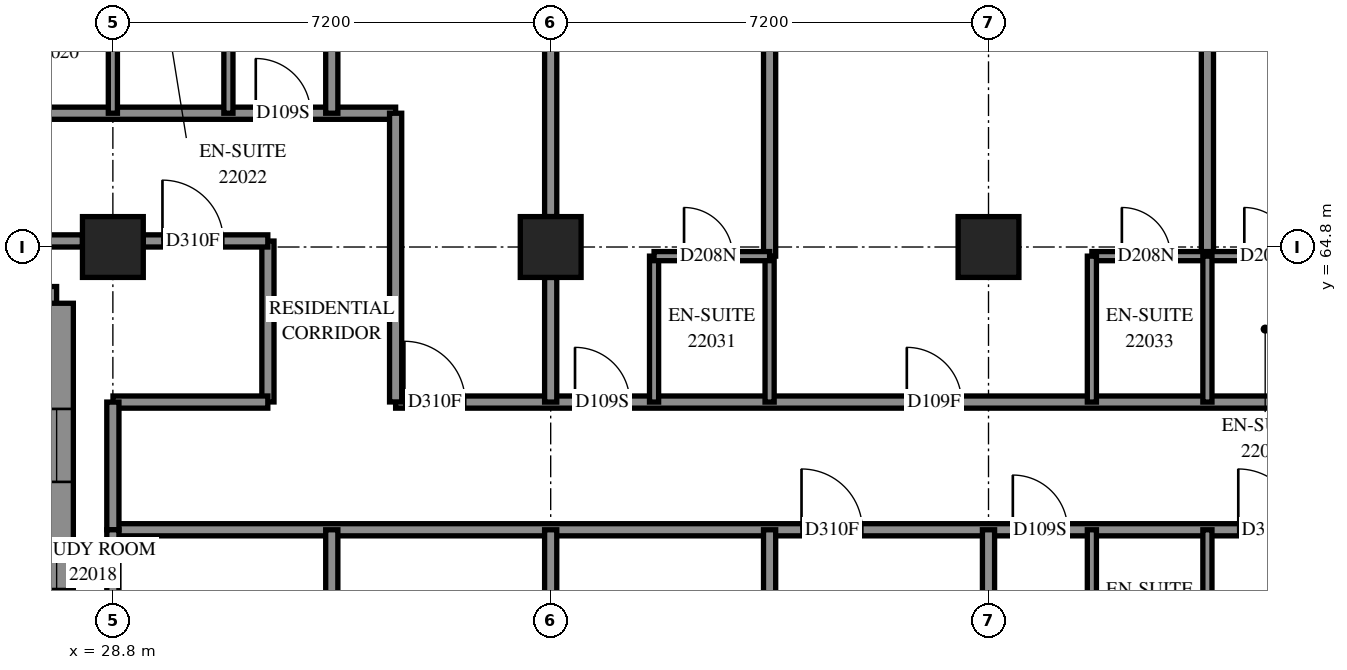
"""IFC4 building model, lengths in metres.
Left out: names, types, materials, properties, quantities, classifications, styles, units other than length and angle.
Written with IfcOpenShell. Run it as: python <this file> out.ifc"""

import sys

from ifc_helpers import new_model, si_unit, direction, frame, frame_2d, origin, origin_2d, place, context, subcontext, project, spatial, polyline, rectangle, outline, extrude, element, fill, save


model = new_model("IFC4")
c1 = context("Model", 3, precision=1e-05, world=origin(), true_north=direction((0.0, 1.0)))
c2 = subcontext(c1, "Body", "Model", "MODEL_VIEW")
j1 = project(units=[si_unit("LENGTHUNIT", "METRE"), si_unit("PLANEANGLEUNIT", "RADIAN")], contexts=[c1])
p1 = place(None, origin())
s1 = spatial("IfcSite", under=j1, at=p1, CompositionType="ELEMENT")
p2 = place(p1, origin())
s2 = spatial("IfcBuilding", under=s1, at=p2, CompositionType="ELEMENT")
p3 = place(p2, frame((0.0, 0.0, 84.6)))
s3 = spatial("IfcBuildingStorey", under=s2, at=p3, CompositionType="ELEMENT", Elevation=84.6)
for number, where, z_axis, x_axis in (
    (1, (28.8, 64.8, 0.0), (0.0, 0.0, 1.0), (1.0, 0.0, 0.0)),
    (2, (36.0, 64.8, 0.0), (0.0, 0.0, 1.0), (1.0, 0.0, 0.0)),
    (3, (43.2, 64.8, 0.0), (0.0, 0.0, 1.0), (1.0, 0.0, 0.0)),
):
    element("IfcColumn", number, at=place(p3, frame(where, z_axis=z_axis, x_axis=x_axis)), inside=s3, PredefinedType="COLUMN", context=c2, shape_type="SweptSolid", body=[
        extrude(rectangle(XDim=1.0, YDim=1.0, at=origin_2d()), origin(), (0.0, 0.0, 1.0), 3.1),
    ])
p4 = place(p3, frame((19.745, 63.875, 0.0), z_axis=(0.0, 0.0, 1.0), x_axis=(1.0, 0.0, 0.0)))
e4 = element("IfcWall", 4, at=p4, inside=s3, PredefinedType="SOLIDWALL", context=c2, shape_type="SweptSolid", body=[
    extrude(outline(polyline([(-0.275, -0.275), (7.855, -0.275), (8.405, 0.275), (0.275, 0.275), (-0.275, -0.275)])), origin(), (0.0, 0.0, 1.0), 3.1),
])
p5 = place(p4, frame((2.005, 0.0, 0.5)))
e5 = element("IfcOpeningElement", 5, at=p5, cuts=e4, PredefinedType="OPENING", context=c2, shape_type="SweptSolid", body=[
    extrude(rectangle(XDim=1.3, YDim=2.45, at=frame_2d((0.65, 1.225))), frame((0.0, 0.285, 0.0), z_axis=(0.0, -1.0, 0.0), x_axis=(1.0, 0.0, 0.0)), (0.0, 0.0, 1.0), 0.57),
])
p6 = place(p4, frame((3.505, 0.0, 0.5)))
e6 = element("IfcOpeningElement", 6, at=p6, cuts=e4, PredefinedType="OPENING", context=c2, shape_type="SweptSolid", body=[
    extrude(rectangle(XDim=1.3, YDim=2.45, at=frame_2d((0.65, 1.225))), frame((0.0, 0.285, 0.0), z_axis=(0.0, -1.0, 0.0), x_axis=(1.0, 0.0, 0.0)), (0.0, 0.0, 1.0), 0.57),
])
p7 = place(p4, frame((6.093, 0.0, 0.5)))
e7 = element("IfcOpeningElement", 7, at=p7, cuts=e4, PredefinedType="OPENING", context=c2, shape_type="SweptSolid", body=[
    extrude(rectangle(XDim=1.2, YDim=2.45, at=frame_2d((0.6, 1.225))), frame((0.0, 0.285, 0.0), z_axis=(0.0, -1.0, 0.0), x_axis=(1.0, 0.0, 0.0)), (0.0, 0.0, 1.0), 0.57),
])
p8 = place(p3, frame((27.875, 63.875, 0.0), z_axis=(0.0, 0.0, 1.0), x_axis=(0.0, -1.0, 0.0)))
e8 = element("IfcWall", 8, at=p8, inside=s3, PredefinedType="SOLIDWALL", context=c2, shape_type="SweptSolid", body=[
    extrude(outline(polyline([(0.275, -0.275), (8.405, -0.275), (7.855, 0.275), (-0.275, 0.275), (0.275, -0.275)])), origin(), (0.0, 0.0, 1.0), 3.1),
])
p9 = place(p8, frame((4.825, 0.0, 0.5)))
e9 = element("IfcOpeningElement", 9, at=p9, cuts=e8, PredefinedType="OPENING", context=c2, shape_type="SweptSolid", body=[
    extrude(rectangle(XDim=1.3, YDim=2.45, at=frame_2d((0.65, 1.225))), frame((0.0, 0.285, 0.0), z_axis=(0.0, -1.0, 0.0), x_axis=(1.0, 0.0, 0.0)), (0.0, 0.0, 1.0), 0.57),
])
p10 = place(p8, frame((1.738, 0.0, 0.5)))
e10 = element("IfcOpeningElement", 10, at=p10, cuts=e8, PredefinedType="OPENING", context=c2, shape_type="SweptSolid", body=[
    extrude(rectangle(XDim=1.2, YDim=2.45, at=frame_2d((0.6, 1.225))), frame((0.0, 0.285, 0.0), z_axis=(0.0, -1.0, 0.0), x_axis=(1.0, 0.0, 0.0)), (0.0, 0.0, 1.0), 0.57),
])
p11 = place(p8, frame((3.9, 0.0, 0.45)))
e11 = element("IfcOpeningElement", 11, at=p11, cuts=e8, PredefinedType="OPENING", context=c2, shape_type="SweptSolid", body=[
    extrude(rectangle(XDim=0.8, YDim=2.5, at=frame_2d((0.4, 1.25))), frame((0.0, 0.285, 0.0), z_axis=(0.0, -1.0, 0.0), x_axis=(1.0, 0.0, 0.0)), (0.0, 0.0, 1.0), 0.57),
])
p12 = place(p3, frame((28.8, 60.15, 0.0), z_axis=(0.0, 0.0, 1.0), x_axis=(1.0, 0.0, 0.0)))
e12 = element("IfcWall", 12, at=p12, inside=s3, PredefinedType="PARTITIONING", context=c2, shape_type="SweptSolid", body=[
    extrude(rectangle(XDim=24.15, YDim=0.2, at=frame_2d((12.075, 0.0))), origin(), (0.0, 0.0, 1.0), 3.1),
])
p13 = place(p12, frame((11.325, 0.0, 0.0)))
e13 = element("IfcOpeningElement", 13, at=p13, cuts=e12, PredefinedType="OPENING", context=c2, shape_type="SweptSolid", body=[
    extrude(rectangle(XDim=1.0, YDim=2.1, at=frame_2d((0.5, 1.05))), frame((0.0, 0.11, 0.0), z_axis=(0.0, -1.0, 0.0), x_axis=(1.0, 0.0, 0.0)), (0.0, 0.0, 1.0), 0.22),
])
p14 = place(p12, frame((14.8, 0.0, 0.0)))
e14 = element("IfcOpeningElement", 14, at=p14, cuts=e12, PredefinedType="OPENING", context=c2, shape_type="SweptSolid", body=[
    extrude(rectangle(XDim=0.9, YDim=2.1, at=frame_2d((0.45, 1.05))), frame((0.0, 0.11, 0.0), z_axis=(0.0, -1.0, 0.0), x_axis=(1.0, 0.0, 0.0)), (0.0, 0.0, 1.0), 0.22),
])
p15 = place(p12, frame((18.508, 0.0, 0.0)))
e15 = element("IfcOpeningElement", 15, at=p15, cuts=e12, PredefinedType="OPENING", context=c2, shape_type="SweptSolid", body=[
    extrude(rectangle(XDim=1.0, YDim=2.1, at=frame_2d((0.5, 1.05))), frame((0.0, 0.11, 0.0), z_axis=(0.0, -1.0, 0.0), x_axis=(1.0, 0.0, 0.0)), (0.0, 0.0, 1.0), 0.22),
])
p16 = place(p12, frame((22.882, 0.0, 0.0)))
e16 = element("IfcOpeningElement", 16, at=p16, cuts=e12, PredefinedType="OPENING", context=c2, shape_type="SweptSolid", body=[
    extrude(rectangle(XDim=1.0, YDim=2.1, at=frame_2d((0.5, 1.05))), frame((0.0, 0.11, 0.0), z_axis=(0.0, -1.0, 0.0), x_axis=(1.0, 0.0, 0.0)), (0.0, 0.0, 1.0), 0.22),
])
p17 = place(p3, frame((33.45, 62.25, 0.0), z_axis=(0.0, 0.0, 1.0), x_axis=(1.0, 0.0, 0.0)))
e17 = element("IfcWall", 17, at=p17, inside=s3, PredefinedType="PARTITIONING", context=c2, shape_type="SweptSolid", body=[
    extrude(rectangle(XDim=21.85, YDim=0.2, at=frame_2d((10.925, 0.0))), origin(), (0.0, 0.0, 1.0), 3.1),
])
p18 = place(p17, frame((0.144, 0.0, 0.0)))
e18 = element("IfcOpeningElement", 18, at=p18, cuts=e17, PredefinedType="OPENING", context=c2, shape_type="SweptSolid", body=[
    extrude(rectangle(XDim=1.0, YDim=2.1, at=frame_2d((0.5, 1.05))), frame((0.0, 0.11, 0.0), z_axis=(0.0, -1.0, 0.0), x_axis=(1.0, 0.0, 0.0)), (0.0, 0.0, 1.0), 0.22),
])
p19 = place(p17, frame((2.95, 0.0, 0.0)))
e19 = element("IfcOpeningElement", 19, at=p19, cuts=e17, PredefinedType="OPENING", context=c2, shape_type="SweptSolid", body=[
    extrude(rectangle(XDim=0.9, YDim=2.1, at=frame_2d((0.45, 1.05))), frame((0.0, 0.11, 0.0), z_axis=(0.0, -1.0, 0.0), x_axis=(1.0, 0.0, 0.0)), (0.0, 0.0, 1.0), 0.22),
])
p20 = place(p17, frame((8.407, 0.0, 0.0)))
e20 = element("IfcOpeningElement", 20, at=p20, cuts=e17, PredefinedType="OPENING", context=c2, shape_type="SweptSolid", body=[
    extrude(rectangle(XDim=0.9, YDim=2.1, at=frame_2d((0.45, 1.05))), frame((0.0, 0.11, 0.0), z_axis=(0.0, -1.0, 0.0), x_axis=(1.0, 0.0, 0.0)), (0.0, 0.0, 1.0), 0.22),
])
p21 = place(p17, frame((15.7, 0.0, 0.0)))
e21 = element("IfcOpeningElement", 21, at=p21, cuts=e17, PredefinedType="OPENING", context=c2, shape_type="SweptSolid", body=[
    extrude(rectangle(XDim=0.9, YDim=2.1, at=frame_2d((0.45, 1.05))), frame((0.0, 0.11, 0.0), z_axis=(0.0, -1.0, 0.0), x_axis=(1.0, 0.0, 0.0)), (0.0, 0.0, 1.0), 0.22),
])
p22 = place(p17, frame((17.35, 0.0, 0.0)))
e22 = element("IfcOpeningElement", 22, at=p22, cuts=e17, PredefinedType="OPENING", context=c2, shape_type="SweptSolid", body=[
    extrude(rectangle(XDim=0.9, YDim=2.1, at=frame_2d((0.45, 1.05))), frame((0.0, 0.11, 0.0), z_axis=(0.0, -1.0, 0.0), x_axis=(1.0, 0.0, 0.0)), (0.0, 0.0, 1.0), 0.22),
])
p23 = place(p3, frame((21.602, 67.0, 0.0), z_axis=(0.0, 0.0, 1.0), x_axis=(1.0, 0.0, 0.0)))
e23 = element("IfcWall", 23, at=p23, inside=s3, PredefinedType="PARTITIONING", context=c2, shape_type="SweptSolid", body=[
    extrude(rectangle(XDim=11.848, YDim=0.2, at=frame_2d((5.924, 0.0))), origin(), (0.0, 0.0, 1.0), 3.1),
])
p24 = place(p23, frame((1.791, 0.0, 0.0)))
e24 = element("IfcOpeningElement", 24, at=p24, cuts=e23, PredefinedType="OPENING", context=c2, shape_type="SweptSolid", body=[
    extrude(rectangle(XDim=1.0, YDim=2.1, at=frame_2d((0.5, 1.05))), frame((0.0, 0.11, 0.0), z_axis=(0.0, -1.0, 0.0), x_axis=(1.0, 0.0, 0.0)), (0.0, 0.0, 1.0), 0.22),
])
p25 = place(p23, frame((3.998, 0.0, 0.0)))
e25 = element("IfcOpeningElement", 25, at=p25, cuts=e23, PredefinedType="OPENING", context=c2, shape_type="SweptSolid", body=[
    extrude(rectangle(XDim=0.9, YDim=2.1, at=frame_2d((0.45, 1.05))), frame((0.0, 0.11, 0.0), z_axis=(0.0, -1.0, 0.0), x_axis=(1.0, 0.0, 0.0)), (0.0, 0.0, 1.0), 0.22),
])
p26 = place(p23, frame((9.548, 0.0, 0.0)))
e26 = element("IfcOpeningElement", 26, at=p26, cuts=e23, PredefinedType="OPENING", context=c2, shape_type="SweptSolid", body=[
    extrude(rectangle(XDim=0.9, YDim=2.1, at=frame_2d((0.45, 1.05))), frame((0.0, 0.11, 0.0), z_axis=(0.0, -1.0, 0.0), x_axis=(1.0, 0.0, 0.0)), (0.0, 0.0, 1.0), 0.22),
])
p27 = place(p3, frame((39.6, 64.65, 0.0), z_axis=(0.0, 0.0, 1.0), x_axis=(0.0, 1.0, 0.0)))
e27 = element("IfcWall", 27, at=p27, inside=s3, PredefinedType="PARTITIONING", context=c2, shape_type="SweptSolid", body=[
    extrude(rectangle(XDim=8.101, YDim=0.2, at=frame_2d((4.051, 0.0))), origin(), (0.0, 0.0, 1.0), 3.1),
])
p28 = place(p3, frame((46.8, 64.65, 0.0), z_axis=(0.0, 0.0, 1.0), x_axis=(0.0, 1.0, 0.0)))
e28 = element("IfcWall", 28, at=p28, inside=s3, PredefinedType="PARTITIONING", context=c2, shape_type="SweptSolid", body=[
    extrude(rectangle(XDim=8.069, YDim=0.2, at=frame_2d((4.034, 0.0))), origin(), (0.0, 0.0, 1.0), 3.1),
])
p29 = place(p3, frame((36.0, 65.3, 0.0), z_axis=(0.0, 0.0, 1.0), x_axis=(0.0, 1.0, 0.0)))
e29 = element("IfcWall", 29, at=p29, inside=s3, PredefinedType="PARTITIONING", context=c2, shape_type="SweptSolid", body=[
    extrude(rectangle(XDim=6.2, YDim=0.2, at=frame_2d((3.1, 0.0))), origin(), (0.0, 0.0, 1.0), 3.1),
])
p30 = place(p3, frame((22.1, 64.9, 0.0), z_axis=(0.0, 0.0, 1.0), x_axis=(1.0, 0.0, 0.0)))
e30 = element("IfcWall", 30, at=p30, inside=s3, PredefinedType="PARTITIONING", context=c2, shape_type="SweptSolid", body=[
    extrude(rectangle(XDim=6.2, YDim=0.2, at=frame_2d((3.1, 0.0))), origin(), (0.0, 0.0, 1.0), 2.6),
])
p31 = place(p3, frame((32.4, 67.0, 0.0), z_axis=(0.0, 0.0, 1.0), x_axis=(0.0, 1.0, 0.0)))
e31 = element("IfcWall", 31, at=p31, inside=s3, PredefinedType="PARTITIONING", context=c2, shape_type="SweptSolid", body=[
    extrude(rectangle(XDim=5.784, YDim=0.2, at=frame_2d((2.892, 0.0))), origin(), (0.0, 0.0, 1.0), 3.1),
])
p32 = place(p3, frame((33.45, 62.252, 0.0), z_axis=(0.0, 0.0, 1.0), x_axis=(0.0, 1.0, 0.0)))
e32 = element("IfcWall", 32, at=p32, inside=s3, PredefinedType="PARTITIONING", context=c2, shape_type="SweptSolid", body=[
    extrude(rectangle(XDim=4.748, YDim=0.2, at=frame_2d((2.374, 0.0))), origin(), (0.0, 0.0, 1.0), 3.1),
])
for number, where, z_axis, x_axis in (
    (33, (32.4, 56.02, 0.0), (0.0, 0.0, 1.0), (0.0, 1.0, 0.0)),
    (34, (39.6, 56.02, 0.0), (0.0, 0.0, 1.0), (0.0, 1.0, 0.0)),
):
    element("IfcWall", number, at=place(p3, frame(where, z_axis=z_axis, x_axis=x_axis)), inside=s3, PredefinedType="PARTITIONING", context=c2, shape_type="SweptSolid", body=[
        extrude(rectangle(XDim=4.13, YDim=0.2, at=frame_2d((2.065, 0.0))), origin(), (0.0, 0.0, 1.0), 3.1),
    ])
p33 = place(p3, frame((44.9, 64.65, 0.0), z_axis=(0.0, 0.0, 1.0), x_axis=(1.0, 0.0, 0.0)))
e35 = element("IfcWall", 35, at=p33, inside=s3, PredefinedType="PARTITIONING", context=c2, shape_type="SweptSolid", body=[
    extrude(rectangle(XDim=3.8, YDim=0.15, at=frame_2d((1.9, 0.0))), origin(), (0.0, 0.0, 1.0), 3.1),
])
p34 = place(p33, frame((0.493, 0.0, 0.0)))
e36 = element("IfcOpeningElement", 36, at=p34, cuts=e35, PredefinedType="OPENING", context=c2, shape_type="SweptSolid", body=[
    extrude(rectangle(XDim=0.8, YDim=2.1, at=frame_2d((0.4, 1.05))), frame((0.0, 0.085, 0.0), z_axis=(0.0, -1.0, 0.0), x_axis=(1.0, 0.0, 0.0)), (0.0, 0.0, 1.0), 0.17),
])
p35 = place(p33, frame((2.507, 0.0, 0.0)))
e37 = element("IfcOpeningElement", 37, at=p35, cuts=e35, PredefinedType="OPENING", context=c2, shape_type="SweptSolid", body=[
    extrude(rectangle(XDim=0.8, YDim=2.1, at=frame_2d((0.4, 1.05))), frame((0.0, 0.085, 0.0), z_axis=(0.0, -1.0, 0.0), x_axis=(1.0, 0.0, 0.0)), (0.0, 0.0, 1.0), 0.17),
])
p36 = place(p3, frame((31.35, 62.252, 0.0), z_axis=(0.0, 0.0, 1.0), x_axis=(0.0, 1.0, 0.0)))
e38 = element("IfcWall", 38, at=p36, inside=s3, PredefinedType="PARTITIONING", context=c2, shape_type="SweptSolid", body=[
    extrude(rectangle(XDim=2.646, YDim=0.2, at=frame_2d((1.323, 0.0))), origin(), (0.0, 0.0, 1.0), 3.1),
])
p37 = place(p3, frame((28.802, 62.25, 0.0), z_axis=(0.0, 0.0, 1.0), x_axis=(1.0, 0.0, 0.0)))
e39 = element("IfcWall", 39, at=p37, inside=s3, PredefinedType="PARTITIONING", context=c2, shape_type="SweptSolid", body=[
    extrude(rectangle(XDim=2.546, YDim=0.2, at=frame_2d((1.273, 0.0))), origin(), (0.0, 0.0, 1.0), 3.1),
])
for number, where, z_axis, x_axis in (
    (40, (28.8, 67.0, 0.0), (0.0, 0.0, 1.0), (0.0, 1.0, 0.0)),
    (41, (30.7, 67.0, 0.0), (0.0, 0.0, 1.0), (0.0, 1.0, 0.0)),
    (42, (37.7, 62.25, 0.0), (0.0, 0.0, 1.0), (0.0, 1.0, 0.0)),
    (43, (39.6, 62.25, 0.0), (0.0, 0.0, 1.0), (0.0, 1.0, 0.0)),
    (44, (44.9, 62.25, 0.0), (0.0, 0.0, 1.0), (0.0, 1.0, 0.0)),
    (45, (46.8, 62.25, 0.0), (0.0, 0.0, 1.0), (0.0, 1.0, 0.0)),
    (46, (44.9, 57.75, 0.0), (0.0, 0.0, 1.0), (0.0, 1.0, 0.0)),
    (47, (46.8, 57.75, 0.0), (0.0, 0.0, 1.0), (0.0, 1.0, 0.0)),
):
    element("IfcWall", number, at=place(p3, frame(where, z_axis=z_axis, x_axis=x_axis)), inside=s3, PredefinedType="PARTITIONING", context=c2, shape_type="SweptSolid", body=[
        extrude(rectangle(XDim=2.4, YDim=0.15, at=frame_2d((1.2, 0.0))), origin(), (0.0, 0.0, 1.0), 3.1),
    ])
p38 = place(p3, frame((28.8, 60.15, 0.0), z_axis=(0.0, 0.0, 1.0), x_axis=(0.0, 1.0, 0.0)))
e48 = element("IfcWall", 48, at=p38, inside=s3, PredefinedType="PARTITIONING", context=c2, shape_type="SweptSolid", body=[
    extrude(rectangle(XDim=2.1, YDim=0.2, at=frame_2d((1.05, 0.0))), origin(), (0.0, 0.0, 1.0), 2.6),
])
p39 = place(p3, frame((28.8, 58.1, 0.0), z_axis=(0.0, 0.0, 1.0), x_axis=(0.0, 1.0, 0.0)))
e49 = element("IfcWall", 49, at=p39, inside=s3, PredefinedType="PARTITIONING", context=c2, shape_type="SweptSolid", body=[
    extrude(rectangle(XDim=2.05, YDim=0.2, at=frame_2d((1.025, 0.0))), origin(), (0.0, 0.0, 1.0), 2.6),
])
for number, where, z_axis, x_axis in (
    (50, (36.0, 58.1, 0.0), (0.0, 0.0, 1.0), (0.0, 1.0, 0.0)),
    (51, (36.0, 62.25, 0.0), (0.0, 0.0, 1.0), (0.0, 1.0, 0.0)),
    (52, (43.2, 58.1, 0.0), (0.0, 0.0, 1.0), (0.0, 1.0, 0.0)),
):
    element("IfcWall", number, at=place(p3, frame(where, z_axis=z_axis, x_axis=x_axis)), inside=s3, PredefinedType="PARTITIONING", context=c2, shape_type="SweptSolid", body=[
        extrude(rectangle(XDim=2.05, YDim=0.2, at=frame_2d((1.025, 0.0))), origin(), (0.0, 0.0, 1.0), 3.1),
    ])
p40 = place(p3, frame((29.3, 64.9, 0.0), z_axis=(0.0, 0.0, 1.0), x_axis=(1.0, 0.0, 0.0)))
e53 = element("IfcWall", 53, at=p40, inside=s3, PredefinedType="PARTITIONING", context=c2, shape_type="SweptSolid", body=[
    extrude(rectangle(XDim=2.048, YDim=0.2, at=frame_2d((1.024, 0.0))), origin(), (0.0, 0.0, 1.0), 3.1),
])
p41 = place(p40, frame((0.316, 0.0, 0.0)))
e54 = element("IfcOpeningElement", 54, at=p41, cuts=e53, PredefinedType="OPENING", context=c2, shape_type="SweptSolid", body=[
    extrude(rectangle(XDim=1.0, YDim=2.1, at=frame_2d((0.5, 1.05))), frame((0.0, 0.11, 0.0), z_axis=(0.0, -1.0, 0.0), x_axis=(1.0, 0.0, 0.0)), (0.0, 0.0, 1.0), 0.22),
])
p42 = place(p3, frame((37.7, 64.65, 0.0), z_axis=(0.0, 0.0, 1.0), x_axis=(1.0, 0.0, 0.0)))
e55 = element("IfcWall", 55, at=p42, inside=s3, PredefinedType="PARTITIONING", context=c2, shape_type="SweptSolid", body=[
    extrude(rectangle(XDim=1.9, YDim=0.15, at=frame_2d((0.95, 0.0))), origin(), (0.0, 0.0, 1.0), 3.1),
])
p43 = place(p42, frame((0.493, 0.0, 0.0)))
e56 = element("IfcOpeningElement", 56, at=p43, cuts=e55, PredefinedType="OPENING", context=c2, shape_type="SweptSolid", body=[
    extrude(rectangle(XDim=0.8, YDim=2.1, at=frame_2d((0.4, 1.05))), frame((0.0, 0.085, 0.0), z_axis=(0.0, -1.0, 0.0), x_axis=(1.0, 0.0, 0.0)), (0.0, 0.0, 1.0), 0.17),
])
p44 = place(p10, origin())
e57 = element("IfcWindow", 57, at=p44, inside=s3, PartitioningType="SINGLE_PANEL", PredefinedType="WINDOW", context=c2, shape_type="SweptSolid", body=[
    extrude(rectangle(XDim=1.2, YDim=2.45, at=frame_2d((0.6, 1.225))), frame((0.0, 0.155, 0.0), z_axis=(0.0, -1.0, 0.0), x_axis=(1.0, 0.0, 0.0)), (0.0, 0.0, 1.0), 0.06),
])
fill(e10, e57)
p45 = place(p41, origin())
e58 = element("IfcDoor", 58, at=p45, inside=s3, OperationType="SINGLE_SWING_RIGHT", PredefinedType="DOOR", context=c2, shape_type="SweptSolid", body=[
    extrude(rectangle(XDim=1.0, YDim=2.1, at=frame_2d((0.5, 1.05))), frame((0.0, 0.025, 0.0), z_axis=(0.0, -1.0, 0.0), x_axis=(1.0, 0.0, 0.0)), (0.0, 0.0, 1.0), 0.05),
])
fill(e54, e58)
p46 = place(p26, origin())
e59 = element("IfcDoor", 59, at=p46, inside=s3, OperationType="SINGLE_SWING_RIGHT", PredefinedType="DOOR", context=c2, shape_type="SweptSolid", body=[
    extrude(rectangle(XDim=0.9, YDim=2.1, at=frame_2d((0.45, 1.05))), frame((0.0, 0.025, 0.0), z_axis=(0.0, -1.0, 0.0), x_axis=(1.0, 0.0, 0.0)), (0.0, 0.0, 1.0), 0.05),
])
fill(e26, e59)
p47 = place(p18, origin())
e60 = element("IfcDoor", 60, at=p47, inside=s3, OperationType="SINGLE_SWING_LEFT", PredefinedType="DOOR", context=c2, shape_type="SweptSolid", body=[
    extrude(rectangle(XDim=1.0, YDim=2.1, at=frame_2d((0.5, 1.05))), frame((0.0, 0.025, 0.0), z_axis=(0.0, -1.0, 0.0), x_axis=(1.0, 0.0, 0.0)), (0.0, 0.0, 1.0), 0.05),
])
fill(e18, e60)
p48 = place(p19, origin())
e61 = element("IfcDoor", 61, at=p48, inside=s3, OperationType="SINGLE_SWING_RIGHT", PredefinedType="DOOR", context=c2, shape_type="SweptSolid", body=[
    extrude(rectangle(XDim=0.9, YDim=2.1, at=frame_2d((0.45, 1.05))), frame((0.0, 0.025, 0.0), z_axis=(0.0, -1.0, 0.0), x_axis=(1.0, 0.0, 0.0)), (0.0, 0.0, 1.0), 0.05),
])
fill(e19, e61)
p49 = place(p43, origin())
e62 = element("IfcDoor", 62, at=p49, inside=s3, OperationType="SINGLE_SWING_RIGHT", PredefinedType="DOOR", context=c2, shape_type="SweptSolid", body=[
    extrude(rectangle(XDim=0.8, YDim=2.1, at=frame_2d((0.4, 1.05))), frame((0.0, 0.025, 0.0), z_axis=(0.0, -1.0, 0.0), x_axis=(1.0, 0.0, 0.0)), (0.0, 0.0, 1.0), 0.05),
])
fill(e56, e62)
p50 = place(p20, origin())
e63 = element("IfcDoor", 63, at=p50, inside=s3, OperationType="SINGLE_SWING_LEFT", PredefinedType="DOOR", context=c2, shape_type="SweptSolid", body=[
    extrude(rectangle(XDim=0.9, YDim=2.1, at=frame_2d((0.45, 1.05))), frame((0.0, 0.025, 0.0), z_axis=(0.0, -1.0, 0.0), x_axis=(1.0, 0.0, 0.0)), (0.0, 0.0, 1.0), 0.05),
])
fill(e20, e63)
p51 = place(p34, origin())
e64 = element("IfcDoor", 64, at=p51, inside=s3, OperationType="SINGLE_SWING_RIGHT", PredefinedType="DOOR", context=c2, shape_type="SweptSolid", body=[
    extrude(rectangle(XDim=0.8, YDim=2.1, at=frame_2d((0.4, 1.05))), frame((0.0, 0.025, 0.0), z_axis=(0.0, -1.0, 0.0), x_axis=(1.0, 0.0, 0.0)), (0.0, 0.0, 1.0), 0.05),
])
fill(e36, e64)
p52 = place(p35, origin())
e65 = element("IfcDoor", 65, at=p52, inside=s3, OperationType="SINGLE_SWING_RIGHT", PredefinedType="DOOR", context=c2, shape_type="SweptSolid", body=[
    extrude(rectangle(XDim=0.8, YDim=2.1, at=frame_2d((0.4, 1.05))), frame((0.0, 0.025, 0.0), z_axis=(0.0, -1.0, 0.0), x_axis=(1.0, 0.0, 0.0)), (0.0, 0.0, 1.0), 0.05),
])
fill(e37, e65)
p53 = place(p13, origin())
e66 = element("IfcDoor", 66, at=p53, inside=s3, OperationType="SINGLE_SWING_RIGHT", PredefinedType="DOOR", context=c2, shape_type="SweptSolid", body=[
    extrude(rectangle(XDim=1.0, YDim=2.1, at=frame_2d((0.5, 1.05))), frame((0.0, 0.025, 0.0), z_axis=(0.0, -1.0, 0.0), x_axis=(1.0, 0.0, 0.0)), (0.0, 0.0, 1.0), 0.05),
])
fill(e13, e66)
p54 = place(p14, origin())
e67 = element("IfcDoor", 67, at=p54, inside=s3, OperationType="SINGLE_SWING_LEFT", PredefinedType="DOOR", context=c2, shape_type="SweptSolid", body=[
    extrude(rectangle(XDim=0.9, YDim=2.1, at=frame_2d((0.45, 1.05))), frame((0.0, 0.025, 0.0), z_axis=(0.0, -1.0, 0.0), x_axis=(1.0, 0.0, 0.0)), (0.0, 0.0, 1.0), 0.05),
])
fill(e14, e67)
p55 = place(p15, origin())
e68 = element("IfcDoor", 68, at=p55, inside=s3, OperationType="SINGLE_SWING_RIGHT", PredefinedType="DOOR", context=c2, shape_type="SweptSolid", body=[
    extrude(rectangle(XDim=1.0, YDim=2.1, at=frame_2d((0.5, 1.05))), frame((0.0, 0.025, 0.0), z_axis=(0.0, -1.0, 0.0), x_axis=(1.0, 0.0, 0.0)), (0.0, 0.0, 1.0), 0.05),
])
fill(e15, e68)
p56 = place(p11, origin())
e69 = element("IfcWindow", 69, at=p56, inside=s3, PartitioningType="SINGLE_PANEL", PredefinedType="WINDOW", context=c2, shape_type="SweptSolid", body=[
    extrude(rectangle(XDim=0.8, YDim=2.5, at=frame_2d((0.4, 1.25))), frame((0.0, 0.155, 0.0), z_axis=(0.0, -1.0, 0.0), x_axis=(1.0, 0.0, 0.0)), (0.0, 0.0, 1.0), 0.06),
])
fill(e11, e69)
save(model, sys.argv[1])
